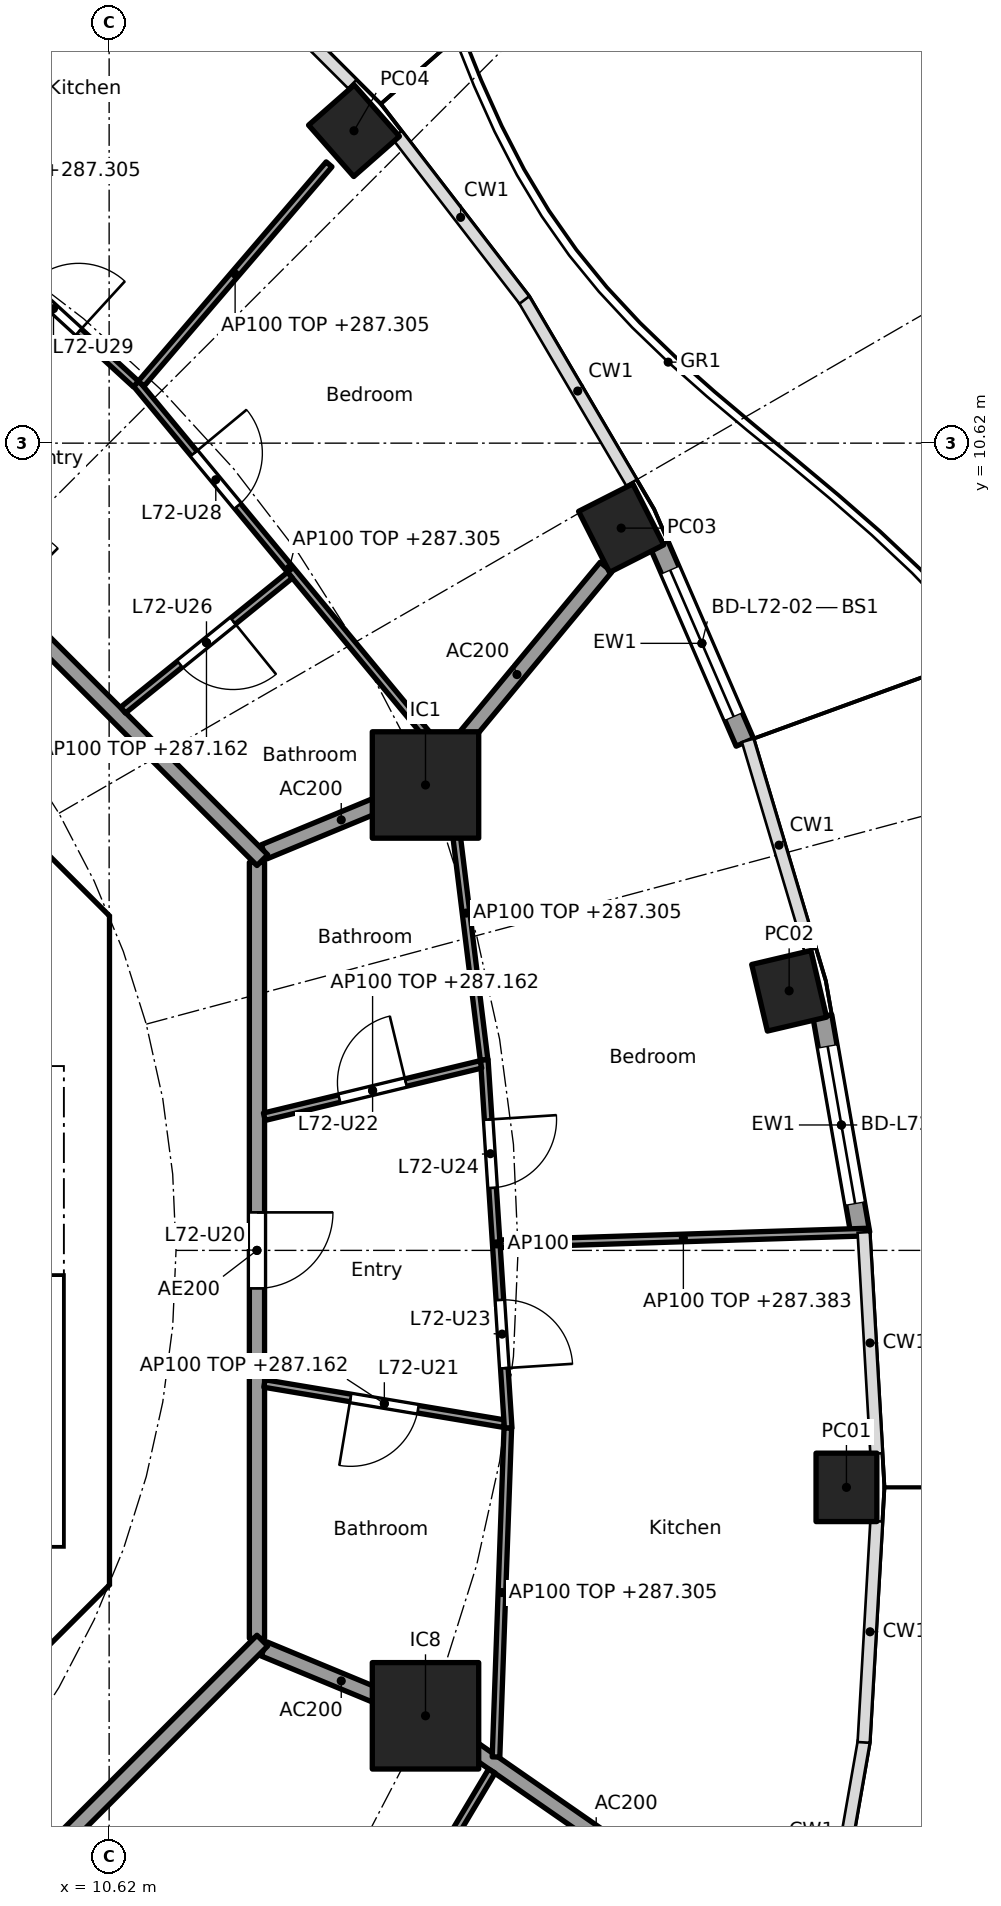
"""IFC4 building model, lengths in metres.
Left out: names, types, materials, properties, quantities, classifications, styles, units other than length and angle.
Written with IfcOpenShell. Run it as: python <this file> out.ifc"""

import sys

from ifc_helpers import new_model, si_unit, direction, frame, frame_2d, origin, origin_2d, place, context, subcontext, project, spatial, polyline, rectangle, hollow_rectangle, outline, extrude, element, fill, save


model = new_model("IFC4")
c1 = context("Model", 3, precision=1e-05, world=origin(), true_north=direction((0.0, 1.0)))
c2 = subcontext(c1, "Body", "Model", "MODEL_VIEW")
j1 = project(units=[si_unit("LENGTHUNIT", "METRE"), si_unit("PLANEANGLEUNIT", "RADIAN")], contexts=[c1])
p1 = place(None, origin())
s1 = spatial("IfcSite", under=j1, at=p1, CompositionType="ELEMENT")
p2 = place(p1, origin())
s2 = spatial("IfcBuilding", under=s1, at=p2, CompositionType="ELEMENT")
p3 = place(p2, frame((0.0, 0.0, 284.4)))
s3 = spatial("IfcBuildingStorey", under=s2, at=p3, CompositionType="ELEMENT", Elevation=284.4)
for number, where, z_axis, x_axis in (
    (1, (20.32, -3.118, 0.0), (0.0, 0.0, 1.0), (0.0, 1.0, 0.0)),
    (2, (19.566, 3.415, 0.0), (0.0, 0.0, 1.0), (-0.229, 0.973, 0.0)),
    (3, (17.356, 9.502, 0.0), (0.0, 0.0, 1.0), (-0.452, 0.892, 0.0)),
    (4, (13.841, 14.73, 0.0), (0.0, 0.0, 1.0), (-0.66, 0.751, 0.0)),
):
    element("IfcColumn", number, at=place(p3, frame(where, z_axis=z_axis, x_axis=x_axis)), inside=s3, PredefinedType="COLUMN", context=c2, shape_type="SweptSolid", body=[
        extrude(hollow_rectangle(XDim=0.9, YDim=0.8, WallThickness=0.028, at=origin_2d()), origin(), (0.0, 0.0, 1.0), 3.7),
    ])
for number, where, z_axis, x_axis in (
    (5, (14.782, 6.123, 0.0), (0.0, 0.0, 1.0), (1.0, 0.0, 0.0)),
    (6, (14.782, -6.123, 0.0), (0.0, 0.0, 1.0), (1.0, 0.0, 0.0)),
):
    element("IfcColumn", number, at=place(p3, frame(where, z_axis=z_axis, x_axis=x_axis)), inside=s3, PredefinedType="COLUMN", context=c2, shape_type="SweptSolid", body=[
        extrude(rectangle(XDim=1.4, YDim=1.4, at=origin_2d()), origin(), (0.0, 0.0, 1.0), 3.7),
    ])
p4 = place(p3, frame((20.004, 3.08, 0.0), z_axis=(0.0, 0.0, 1.0), x_axis=(0.172182411767, -0.985065082661, 0.0)))
e7 = element("IfcWall", 7, at=p4, inside=s3, PredefinedType="SOLIDWALL", context=c2, shape_type="SweptSolid", body=[
    extrude(rectangle(XDim=2.903, YDim=0.25, at=frame_2d((1.451, 0.0))), origin(), (0.0, 0.0, 1.0), 3.44),
])
p5 = place(p4, frame((0.401, 0.0, 0.0)))
e8 = element("IfcOpeningElement", 8, at=p5, cuts=e7, PredefinedType="OPENING", context=c2, shape_type="SweptSolid", body=[
    extrude(rectangle(XDim=2.1, YDim=2.4, at=frame_2d((1.05, 1.2))), frame((0.0, 0.135, 0.0), z_axis=(0.0, -1.0, 0.0), x_axis=(1.0, 0.0, 0.0)), (0.0, 0.0, 1.0), 0.27),
])
p6 = place(p3, frame((17.854, 9.29, 0.0), z_axis=(0.0, 0.0, 1.0), x_axis=(0.397597791596, -0.9175598052, 0.0)))
e9 = element("IfcWall", 9, at=p6, inside=s3, PredefinedType="SOLIDWALL", context=c2, shape_type="SweptSolid", body=[
    extrude(rectangle(XDim=2.841, YDim=0.25, at=frame_2d((1.42, 0.0))), origin(), (0.0, 0.0, 1.0), 3.44),
])
p7 = place(p6, frame((0.371, 0.0, 0.0)))
e10 = element("IfcOpeningElement", 10, at=p7, cuts=e9, PredefinedType="OPENING", context=c2, shape_type="SweptSolid", body=[
    extrude(rectangle(XDim=2.1, YDim=2.4, at=frame_2d((1.05, 1.2))), frame((0.0, 0.135, 0.0), z_axis=(0.0, -1.0, 0.0), x_axis=(1.0, 0.0, 0.0)), (0.0, 0.0, 1.0), 0.27),
])
p8 = place(p3, frame((9.988, 4.613, 0.0), z_axis=(0.0, 0.0, 1.0), x_axis=(-0.707106781187, 0.707106781187, 0.0)))
e11 = element("IfcWall", 11, at=p8, inside=s3, PredefinedType="SHEAR", context=c2, shape_type="SweptSolid", body=[
    extrude(rectangle(XDim=7.602, YDim=0.6, at=frame_2d((3.801, 0.0))), origin(), (0.0, 0.0, 1.0), 3.44),
])
p9 = place(p8, frame((3.201, 0.0, 0.0)))
e12 = element("IfcOpeningElement", 12, at=p9, cuts=e11, PredefinedType="OPENING", context=c2, shape_type="SweptSolid", body=[
    extrude(rectangle(XDim=1.2, YDim=2.1, at=frame_2d((0.6, 1.05))), frame((0.0, 0.31, 0.0), z_axis=(0.0, -1.0, 0.0), x_axis=(1.0, 0.0, 0.0)), (0.0, 0.0, 1.0), 0.62),
])
p10 = place(p3, frame((4.613, -9.988, 0.0), z_axis=(0.0, 0.0, 1.0), x_axis=(0.707106781187, 0.707106781187, 0.0)))
e13 = element("IfcWall", 13, at=p10, inside=s3, PredefinedType="SHEAR", context=c2, shape_type="SweptSolid", body=[
    extrude(rectangle(XDim=7.602, YDim=0.6, at=frame_2d((3.801, 0.0))), origin(), (0.0, 0.0, 1.0), 3.44),
])
p11 = place(p10, frame((3.201, 0.0, 0.0)))
e14 = element("IfcOpeningElement", 14, at=p11, cuts=e13, PredefinedType="OPENING", context=c2, shape_type="SweptSolid", body=[
    extrude(rectangle(XDim=1.2, YDim=2.1, at=frame_2d((0.6, 1.05))), frame((0.0, 0.31, 0.0), z_axis=(0.0, -1.0, 0.0), x_axis=(1.0, 0.0, 0.0)), (0.0, 0.0, 1.0), 0.62),
])
p12 = place(p3, frame((6.7, 4.0, 0.0), z_axis=(0.0, 0.0, 1.0), x_axis=(1.0, 0.0, 0.0)))
e15 = element("IfcWall", 15, at=p12, inside=s3, PredefinedType="SOLIDWALL", context=c2, shape_type="SweptSolid", body=[
    extrude(rectangle(XDim=3.325, YDim=0.2, at=frame_2d((1.662, 0.0))), origin(), (0.0, 0.0, 1.0), 3.44),
])
p13 = place(p12, frame((1.25, 0.0, 0.0)))
e16 = element("IfcOpeningElement", 16, at=p13, cuts=e15, PredefinedType="OPENING", context=c2, shape_type="SweptSolid", body=[
    extrude(rectangle(XDim=1.1, YDim=2.1, at=frame_2d((0.55, 1.05))), frame((0.0, 0.11, 0.0), z_axis=(0.0, -1.0, 0.0), x_axis=(1.0, 0.0, 0.0)), (0.0, 0.0, 1.0), 0.22),
])
p14 = place(p3, origin())
e17 = element("IfcWall", 17, at=p14, inside=s3, PredefinedType="SHEAR", context=c2, shape_type="SweptSolid", body=[
    extrude(outline(polyline([(9.776, -4.401), (10.025, -4.152), (10.025, -3.801), (10.025, 4.152), (9.776, 4.401), (10.2, 4.825), (10.625, 4.401), (10.625, -4.401), (10.2, -4.825), (9.776, -4.401)])), origin(), (0.0, 0.0, 1.0), 3.44),
])
p15 = place(p3, origin())
e18 = element("IfcWall", 18, at=p15, inside=s3, PredefinedType="SOLIDWALL", context=c2, shape_type="SweptSolid", body=[
    extrude(outline(polyline([(10.025, -4.1), (6.7, -4.1), (6.7, -3.9), (10.025, -3.9), (10.025, -4.1)])), origin(), (0.0, 0.0, 1.0), 3.44),
])
p16 = place(p3, frame((12.657, 5.243, 0.0), z_axis=(0.0, 0.0, 1.0), x_axis=(0.923853160736, 0.382747093259, 0.0)))
e19 = element("IfcWall", 19, at=p16, inside=s3, PredefinedType="PARTITIONING", context=c2, shape_type="SweptSolid", body=[
    extrude(rectangle(XDim=2.2, YDim=0.2, at=frame_2d((1.1, 0.0))), origin(), (0.0, 0.0, 1.0), 3.44),
])
p17 = place(p3, frame((14.814, 6.161, 0.0), z_axis=(0.0, 0.0, 1.0), x_axis=(0.638050520313, 0.769994502272, 0.0)))
e20 = element("IfcWall", 20, at=p17, inside=s3, PredefinedType="PARTITIONING", context=c2, shape_type="SweptSolid", body=[
    extrude(rectangle(XDim=3.673, YDim=0.2, at=frame_2d((1.836, 0.0))), origin(), (0.0, 0.0, 1.0), 3.44),
])
p18 = place(p3, frame((12.657, -5.243, 0.0), z_axis=(0.0, 0.0, 1.0), x_axis=(0.92383017907, -0.382802560388, 0.0)))
e21 = element("IfcWall", 21, at=p18, inside=s3, PredefinedType="PARTITIONING", context=c2, shape_type="SweptSolid", body=[
    extrude(rectangle(XDim=2.2, YDim=0.2, at=frame_2d((1.1, 0.0))), origin(), (0.0, 0.0, 1.0), 3.44),
])
p19 = place(p3, frame((14.823, -6.151, 0.0), z_axis=(0.0, 0.0, 1.0), x_axis=(0.821435065081, -0.570302054928, 0.0)))
e22 = element("IfcWall", 22, at=p19, inside=s3, PredefinedType="PARTITIONING", context=c2, shape_type="SweptSolid", body=[
    extrude(rectangle(XDim=5.368, YDim=0.2, at=frame_2d((2.684, 0.0))), origin(), (0.0, 0.0, 1.0), 3.44),
])
p20 = place(p3, frame((12.565, -5.104, 0.0), z_axis=(0.0, 0.0, 1.0), x_axis=(0.0, 1.0, 0.0)))
e23 = element("IfcWall", 23, at=p20, inside=s3, PredefinedType="PARTITIONING", context=c2, shape_type="SweptSolid", body=[
    extrude(rectangle(XDim=10.209, YDim=0.2, at=frame_2d((5.104, 0.0))), origin(), (0.0, 0.0, 1.0), 3.44),
])
p21 = place(p20, frame((4.604, 0.0, 0.0)))
e24 = element("IfcOpeningElement", 24, at=p21, cuts=e23, PredefinedType="OPENING", context=c2, shape_type="SweptSolid", body=[
    extrude(rectangle(XDim=1.0, YDim=2.1, at=frame_2d((0.5, 1.05))), frame((0.0, 0.11, 0.0), z_axis=(0.0, -1.0, 0.0), x_axis=(1.0, 0.0, 0.0)), (0.0, 0.0, 1.0), 0.22),
])
p22 = place(p3, frame((12.635, 5.134, 0.0), z_axis=(0.0, 0.0, 1.0), x_axis=(-0.707106781187, 0.707106781187, 0.0)))
e25 = element("IfcWall", 25, at=p22, inside=s3, PredefinedType="PARTITIONING", context=c2, shape_type="SweptSolid", body=[
    extrude(rectangle(XDim=10.609, YDim=0.2, at=frame_2d((5.305, 0.0))), origin(), (0.0, 0.0, 1.0), 3.44),
])
p23 = place(p22, frame((4.804, 0.0, 0.0)))
e26 = element("IfcOpeningElement", 26, at=p23, cuts=e25, PredefinedType="OPENING", context=c2, shape_type="SweptSolid", body=[
    extrude(rectangle(XDim=1.0, YDim=2.1, at=frame_2d((0.5, 1.05))), frame((0.0, 0.11, 0.0), z_axis=(0.0, -1.0, 0.0), x_axis=(1.0, 0.0, 0.0)), (0.0, 0.0, 1.0), 0.22),
])
p24 = place(p3, frame((5.275, -12.494, 0.0), z_axis=(0.0, 0.0, 1.0), x_axis=(0.707106781187, 0.707106781187, 0.0)))
e27 = element("IfcWall", 27, at=p24, inside=s3, PredefinedType="PARTITIONING", context=c2, shape_type="SweptSolid", body=[
    extrude(rectangle(XDim=10.409, YDim=0.2, at=frame_2d((5.205, 0.0))), origin(), (0.0, 0.0, 1.0), 3.44),
])
p25 = place(p24, frame((4.604, 0.0, 0.0)))
e28 = element("IfcOpeningElement", 28, at=p25, cuts=e27, PredefinedType="OPENING", context=c2, shape_type="SweptSolid", body=[
    extrude(rectangle(XDim=1.0, YDim=2.1, at=frame_2d((0.5, 1.05))), frame((0.0, 0.11, 0.0), z_axis=(0.0, -1.0, 0.0), x_axis=(1.0, 0.0, 0.0)), (0.0, 0.0, 1.0), 0.22),
])
p26 = place(p3, frame((12.663, -1.751, 0.0), z_axis=(0.0, 0.0, 1.0), x_axis=(0.98626156497, -0.165191178529, 0.0)))
e29 = element("IfcWall", 29, at=p26, inside=s3, PredefinedType="PARTITIONING", context=c2, shape_type="SweptSolid", body=[
    extrude(rectangle(XDim=3.198, YDim=0.1, at=frame_2d((1.599, 0.0))), origin(), (0.0, 0.0, 1.0), 2.762),
])
p27 = place(p26, frame((1.149, 0.0, 0.0)))
e30 = element("IfcOpeningElement", 30, at=p27, cuts=e29, PredefinedType="OPENING", context=c2, shape_type="SweptSolid", body=[
    extrude(rectangle(XDim=0.9, YDim=2.1, at=frame_2d((0.45, 1.05))), frame((0.0, 0.06, 0.0), z_axis=(0.0, -1.0, 0.0), x_axis=(1.0, 0.0, 0.0)), (0.0, 0.0, 1.0), 0.12),
])
p28 = place(p3, frame((15.87, -2.338, 0.0), z_axis=(0.0, 0.0, 1.0), x_axis=(-0.064797294757, 0.997898447034, 0.0)))
e31 = element("IfcWall", 31, at=p28, inside=s3, PredefinedType="PARTITIONING", context=c2, shape_type="SweptSolid", body=[
    extrude(rectangle(XDim=4.857, YDim=0.1, at=frame_2d((2.428, 0.0))), origin(), (0.0, 0.0, 1.0), 3.44),
])
p29 = place(p28, frame((0.789, 0.0, 0.0)))
e32 = element("IfcOpeningElement", 32, at=p29, cuts=e31, PredefinedType="OPENING", context=c2, shape_type="SweptSolid", body=[
    extrude(rectangle(XDim=0.9, YDim=2.1, at=frame_2d((0.45, 1.05))), frame((0.0, 0.06, 0.0), z_axis=(0.0, -1.0, 0.0), x_axis=(1.0, 0.0, 0.0)), (0.0, 0.0, 1.0), 0.12),
])
p30 = place(p28, frame((3.167, 0.0, 0.0)))
e33 = element("IfcOpeningElement", 33, at=p30, cuts=e31, PredefinedType="OPENING", context=c2, shape_type="SweptSolid", body=[
    extrude(rectangle(XDim=0.9, YDim=2.1, at=frame_2d((0.45, 1.05))), frame((0.0, 0.06, 0.0), z_axis=(0.0, -1.0, 0.0), x_axis=(1.0, 0.0, 0.0)), (0.0, 0.0, 1.0), 0.12),
])
p31 = place(p3, frame((15.865, -2.338, 0.0), z_axis=(0.0, 0.0, 1.0), x_axis=(-0.035864509465, -0.999356661538, 0.0)))
e34 = element("IfcWall", 34, at=p31, inside=s3, PredefinedType="PARTITIONING", context=c2, shape_type="SweptSolid", body=[
    extrude(rectangle(XDim=4.329, YDim=0.1, at=frame_2d((2.165, 0.0))), origin(), (0.0, 0.0, 1.0), 2.905),
])
p32 = place(p3, frame((15.763, 0.087, 0.0), z_axis=(0.0, 0.0, 1.0), x_axis=(0.999492034598, 0.03186962151, 0.0)))
e35 = element("IfcWall", 35, at=p32, inside=s3, PredefinedType="PARTITIONING", context=c2, shape_type="SweptSolid", body=[
    extrude(rectangle(XDim=4.826, YDim=0.1, at=frame_2d((2.413, 0.0))), origin(), (0.0, 0.0, 1.0), 2.983),
])
p33 = place(p3, frame((12.662, 1.758, 0.0), z_axis=(0.0, 0.0, 1.0), x_axis=(0.972004827836, 0.234960879007, 0.0)))
e36 = element("IfcWall", 36, at=p33, inside=s3, PredefinedType="PARTITIONING", context=c2, shape_type="SweptSolid", body=[
    extrude(rectangle(XDim=2.93, YDim=0.1, at=frame_2d((1.465, 0.0))), origin(), (0.0, 0.0, 1.0), 2.762),
])
p34 = place(p33, frame((1.015, 0.0, 0.0)))
e37 = element("IfcOpeningElement", 37, at=p34, cuts=e36, PredefinedType="OPENING", context=c2, shape_type="SweptSolid", body=[
    extrude(rectangle(XDim=0.9, YDim=2.1, at=frame_2d((0.45, 1.05))), frame((0.0, 0.06, 0.0), z_axis=(0.0, -1.0, 0.0), x_axis=(1.0, 0.0, 0.0)), (0.0, 0.0, 1.0), 0.12),
])
p35 = place(p3, frame((15.552, 2.508, 0.0), z_axis=(0.0, 0.0, 1.0), x_axis=(-0.12196293976, 0.992534654974, 0.0)))
e38 = element("IfcWall", 38, at=p35, inside=s3, PredefinedType="PARTITIONING", context=c2, shape_type="SweptSolid", body=[
    extrude(rectangle(XDim=3.887, YDim=0.1, at=frame_2d((1.944, 0.0))), origin(), (0.0, 0.0, 1.0), 2.905),
])
p36 = place(p3, frame((15.002, 6.543, 0.0), z_axis=(0.0, 0.0, 1.0), x_axis=(-0.637932656528, 0.770092154054, 0.0)))
e39 = element("IfcWall", 39, at=p36, inside=s3, PredefinedType="PARTITIONING", context=c2, shape_type="SweptSolid", body=[
    extrude(rectangle(XDim=6.311, YDim=0.1, at=frame_2d((3.155, 0.0))), origin(), (0.0, 0.0, 1.0), 2.905),
])
p37 = place(p36, frame((4.22, 0.0, 0.0)))
e40 = element("IfcOpeningElement", 40, at=p37, cuts=e39, PredefinedType="OPENING", context=c2, shape_type="SweptSolid", body=[
    extrude(rectangle(XDim=0.9, YDim=2.1, at=frame_2d((0.45, 1.05))), frame((0.0, 0.06, 0.0), z_axis=(0.0, -1.0, 0.0), x_axis=(1.0, 0.0, 0.0)), (0.0, 0.0, 1.0), 0.12),
])
p38 = place(p3, frame((10.802, 7.107, 0.0), z_axis=(0.0, 0.0, 1.0), x_axis=(0.777526610395, 0.628850037868, 0.0)))
e41 = element("IfcWall", 41, at=p38, inside=s3, PredefinedType="PARTITIONING", context=c2, shape_type="SweptSolid", body=[
    extrude(rectangle(XDim=2.824, YDim=0.1, at=frame_2d((1.412, 0.0))), origin(), (0.0, 0.0, 1.0), 2.762),
])
p39 = place(p38, frame((0.962, 0.0, 0.0)))
e42 = element("IfcOpeningElement", 42, at=p39, cuts=e41, PredefinedType="OPENING", context=c2, shape_type="SweptSolid", body=[
    extrude(rectangle(XDim=0.9, YDim=2.1, at=frame_2d((0.45, 1.05))), frame((0.0, 0.06, 0.0), z_axis=(0.0, -1.0, 0.0), x_axis=(1.0, 0.0, 0.0)), (0.0, 0.0, 1.0), 0.12),
])
p40 = place(p3, frame((11.041, 11.402, 0.0), z_axis=(0.0, 0.0, 1.0), x_axis=(0.650558544325, 0.759456108282, 0.0)))
e43 = element("IfcWall", 43, at=p40, inside=s3, PredefinedType="PARTITIONING", context=c2, shape_type="SweptSolid", body=[
    extrude(rectangle(XDim=3.8, YDim=0.1, at=frame_2d((1.9, 0.0))), origin(), (0.0, 0.0, 1.0), 2.905),
])
p41 = place(p3, frame((10.972, 11.398, 0.0), z_axis=(0.0, 0.0, 1.0), x_axis=(-0.737830272434, 0.674986288069, 0.0)))
e44 = element("IfcWall", 44, at=p41, inside=s3, PredefinedType="PARTITIONING", context=c2, shape_type="SweptSolid", body=[
    extrude(rectangle(XDim=5.827, YDim=0.1, at=frame_2d((2.914, 0.0))), origin(), (0.0, 0.0, 1.0), 2.905),
])
p42 = place(p41, frame((1.019, 0.0, 0.0)))
e45 = element("IfcOpeningElement", 45, at=p42, cuts=e44, PredefinedType="OPENING", context=c2, shape_type="SweptSolid", body=[
    extrude(rectangle(XDim=0.9, YDim=2.1, at=frame_2d((0.45, 1.05))), frame((0.0, 0.06, 0.0), z_axis=(0.0, -1.0, 0.0), x_axis=(1.0, 0.0, 0.0)), (0.0, 0.0, 1.0), 0.12),
])
p43 = place(p3, frame((13.208, -10.947, 0.0), z_axis=(0.0, 0.0, 1.0), x_axis=(0.512726452516, 0.858552028063, 0.0)))
e46 = element("IfcWall", 46, at=p43, inside=s3, PredefinedType="PARTITIONING", context=c2, shape_type="SweptSolid", body=[
    extrude(rectangle(XDim=4.772, YDim=0.1, at=frame_2d((2.386, 0.0))), origin(), (0.0, 0.0, 1.0), 2.905),
])
p44 = place(p5, origin())
e47 = element("IfcDoor", 47, at=p44, inside=s3, OperationType="SLIDING_TO_LEFT", PredefinedType="DOOR", context=c2, shape_type="SweptSolid", body=[
    extrude(rectangle(XDim=2.1, YDim=2.4, at=frame_2d((1.05, 1.2))), frame((0.0, 0.025, 0.0), z_axis=(0.0, -1.0, 0.0), x_axis=(1.0, 0.0, 0.0)), (0.0, 0.0, 1.0), 0.05),
])
fill(e8, e47)
p45 = place(p7, origin())
e48 = element("IfcDoor", 48, at=p45, inside=s3, OperationType="SLIDING_TO_LEFT", PredefinedType="DOOR", context=c2, shape_type="SweptSolid", body=[
    extrude(rectangle(XDim=2.1, YDim=2.4, at=frame_2d((1.05, 1.2))), frame((0.0, 0.025, 0.0), z_axis=(0.0, -1.0, 0.0), x_axis=(1.0, 0.0, 0.0)), (0.0, 0.0, 1.0), 0.05),
])
fill(e10, e48)
p46 = place(p21, frame((1.0, 0.0, 0.0), x_axis=(-1.0, 0.0, 0.0)))
e49 = element("IfcDoor", 49, at=p46, inside=s3, OperationType="SINGLE_SWING_LEFT", PredefinedType="DOOR", context=c2, shape_type="SweptSolid", body=[
    extrude(rectangle(XDim=1.0, YDim=2.1, at=frame_2d((0.5, 1.05))), frame((0.0, 0.025, 0.0), z_axis=(0.0, -1.0, 0.0), x_axis=(1.0, 0.0, 0.0)), (0.0, 0.0, 1.0), 0.05),
])
fill(e24, e49)
p47 = place(p27, frame((0.9, 0.0, 0.0), x_axis=(-1.0, 0.0, 0.0)))
e50 = element("IfcDoor", 50, at=p47, inside=s3, OperationType="SINGLE_SWING_RIGHT", PredefinedType="DOOR", context=c2, shape_type="SweptSolid", body=[
    extrude(rectangle(XDim=0.9, YDim=2.1, at=frame_2d((0.45, 1.05))), frame((0.0, 0.025, 0.0), z_axis=(0.0, -1.0, 0.0), x_axis=(1.0, 0.0, 0.0)), (0.0, 0.0, 1.0), 0.05),
])
fill(e30, e50)
p48 = place(p34, origin())
e51 = element("IfcDoor", 51, at=p48, inside=s3, OperationType="SINGLE_SWING_RIGHT", PredefinedType="DOOR", context=c2, shape_type="SweptSolid", body=[
    extrude(rectangle(XDim=0.9, YDim=2.1, at=frame_2d((0.45, 1.05))), frame((0.0, 0.025, 0.0), z_axis=(0.0, -1.0, 0.0), x_axis=(1.0, 0.0, 0.0)), (0.0, 0.0, 1.0), 0.05),
])
fill(e37, e51)
p49 = place(p29, frame((0.9, 0.0, 0.0), x_axis=(-1.0, 0.0, 0.0)))
e52 = element("IfcDoor", 52, at=p49, inside=s3, OperationType="SINGLE_SWING_RIGHT", PredefinedType="DOOR", context=c2, shape_type="SweptSolid", body=[
    extrude(rectangle(XDim=0.9, YDim=2.1, at=frame_2d((0.45, 1.05))), frame((0.0, 0.025, 0.0), z_axis=(0.0, -1.0, 0.0), x_axis=(1.0, 0.0, 0.0)), (0.0, 0.0, 1.0), 0.05),
])
fill(e32, e52)
p50 = place(p30, frame((0.9, 0.0, 0.0), x_axis=(-1.0, 0.0, 0.0)))
e53 = element("IfcDoor", 53, at=p50, inside=s3, OperationType="SINGLE_SWING_LEFT", PredefinedType="DOOR", context=c2, shape_type="SweptSolid", body=[
    extrude(rectangle(XDim=0.9, YDim=2.1, at=frame_2d((0.45, 1.05))), frame((0.0, 0.025, 0.0), z_axis=(0.0, -1.0, 0.0), x_axis=(1.0, 0.0, 0.0)), (0.0, 0.0, 1.0), 0.05),
])
fill(e33, e53)
p51 = place(p39, frame((0.9, 0.0, 0.0), x_axis=(-1.0, 0.0, 0.0)))
e54 = element("IfcDoor", 54, at=p51, inside=s3, OperationType="SINGLE_SWING_LEFT", PredefinedType="DOOR", context=c2, shape_type="SweptSolid", body=[
    extrude(rectangle(XDim=0.9, YDim=2.1, at=frame_2d((0.45, 1.05))), frame((0.0, 0.025, 0.0), z_axis=(0.0, -1.0, 0.0), x_axis=(1.0, 0.0, 0.0)), (0.0, 0.0, 1.0), 0.05),
])
fill(e42, e54)
p52 = place(p37, frame((0.9, 0.0, 0.0), x_axis=(-1.0, 0.0, 0.0)))
e55 = element("IfcDoor", 55, at=p52, inside=s3, OperationType="SINGLE_SWING_LEFT", PredefinedType="DOOR", context=c2, shape_type="SweptSolid", body=[
    extrude(rectangle(XDim=0.9, YDim=2.1, at=frame_2d((0.45, 1.05))), frame((0.0, 0.025, 0.0), z_axis=(0.0, -1.0, 0.0), x_axis=(1.0, 0.0, 0.0)), (0.0, 0.0, 1.0), 0.05),
])
fill(e40, e55)
p53 = place(p42, frame((0.9, 0.0, 0.0), x_axis=(-1.0, 0.0, 0.0)))
e56 = element("IfcDoor", 56, at=p53, inside=s3, OperationType="SINGLE_SWING_RIGHT", PredefinedType="DOOR", context=c2, shape_type="SweptSolid", body=[
    extrude(rectangle(XDim=0.9, YDim=2.1, at=frame_2d((0.45, 1.05))), frame((0.0, 0.025, 0.0), z_axis=(0.0, -1.0, 0.0), x_axis=(1.0, 0.0, 0.0)), (0.0, 0.0, 1.0), 0.05),
])
fill(e45, e56)
save(model, sys.argv[1])
